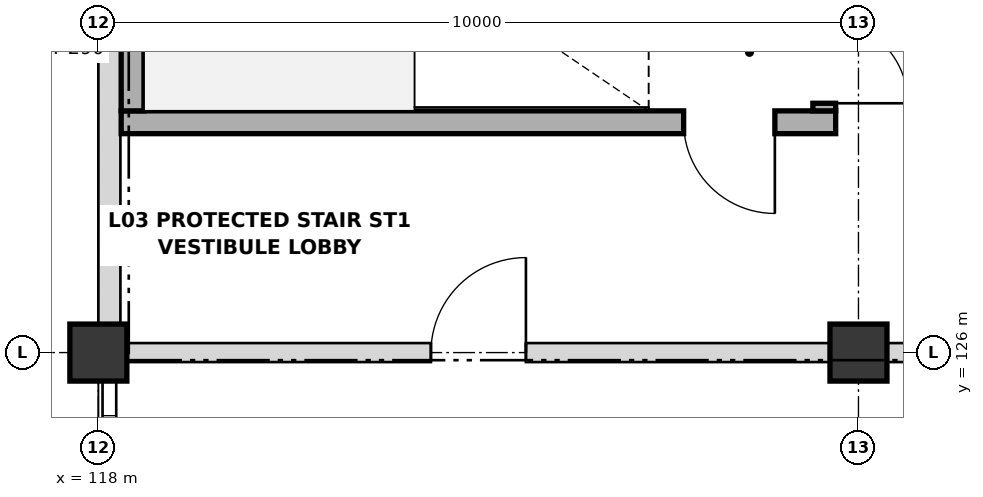
"""IFC4 building model, lengths in metres.
Left out: names, types, materials, properties, quantities, classifications, styles, units other than length and angle.
Written with IfcOpenShell. Run it as: python <this file> out.ifc"""

import sys

from ifc_helpers import new_model, si_unit, direction, frame, frame_2d, origin, origin_2d, place, context, subcontext, project, spatial, rectangle, extrude, element, fill, save


model = new_model("IFC4")
c1 = context("Model", 3, precision=1e-05, world=origin(), true_north=direction((0.0, 1.0)))
c2 = subcontext(c1, "Body", "Model", "MODEL_VIEW")
j1 = project(units=[si_unit("LENGTHUNIT", "METRE"), si_unit("PLANEANGLEUNIT", "RADIAN")], contexts=[c1])
p1 = place(None, origin())
s1 = spatial("IfcSite", under=j1, at=p1, CompositionType="ELEMENT")
p2 = place(p1, origin())
s2 = spatial("IfcBuilding", under=s1, at=p2, CompositionType="ELEMENT")
p3 = place(p2, frame((0.0, 0.0, 14.4)))
s3 = spatial("IfcBuildingStorey", under=s2, at=p3, CompositionType="ELEMENT", Elevation=14.4)
for number, where, z_axis, x_axis in (
    (1, (118.0, 126.0, 0.0), (0.0, 0.0, 1.0), (1.0, 0.0, 0.0)),
    (2, (128.0, 126.0, 0.0), (0.0, 0.0, 1.0), (1.0, 0.0, 0.0)),
):
    element("IfcColumn", number, at=place(p3, frame(where, z_axis=z_axis, x_axis=x_axis)), inside=s3, PredefinedType="COLUMN", context=c2, shape_type="SweptSolid", body=[
        extrude(rectangle(XDim=0.75, YDim=0.75, at=origin_2d()), origin(), (0.0, 0.0, 1.0), 4.2),
    ])
p4 = place(p3, frame((118.145, 126.37, 0.0), z_axis=(0.0, 0.0, 1.0), x_axis=(0.0, 1.0, 0.0)))
e3 = element("IfcWall", 3, at=p4, inside=s3, PredefinedType="SOLIDWALL", context=c2, shape_type="SweptSolid", body=[
    extrude(rectangle(XDim=7.26, YDim=0.29, at=frame_2d((3.63, 0.0))), origin(), (0.0, 0.0, 1.0), 3.078),
])
p5 = place(p3, frame((127.7, 129.03, 0.0), z_axis=(0.0, 0.0, 1.0), x_axis=(-1.0, 0.0, 0.0)))
e4 = element("IfcWall", 4, at=p5, inside=s3, PredefinedType="SHEAR", context=c2, shape_type="SweptSolid", body=[
    extrude(rectangle(XDim=9.4, YDim=0.3, at=frame_2d((4.7, 0.0))), origin(), (0.0, 0.0, 1.0), 4.2),
])
p6 = place(p5, frame((0.8, 0.0, 0.0)))
e5 = element("IfcOpeningElement", 5, at=p6, cuts=e4, PredefinedType="OPENING", context=c2, shape_type="SweptSolid", body=[
    extrude(rectangle(XDim=1.2, YDim=2.15, at=frame_2d((0.6, 1.075))), frame((0.0, 0.16, 0.0), z_axis=(0.0, -1.0, 0.0), x_axis=(1.0, 0.0, 0.0)), (0.0, 0.0, 1.0), 0.32),
])
p7 = place(p3, frame((127.55, 133.68, 0.0), z_axis=(0.0, 0.0, 1.0), x_axis=(0.0, -1.0, 0.0)))
e6 = element("IfcWall", 6, at=p7, inside=s3, PredefinedType="SHEAR", context=c2, shape_type="SweptSolid", body=[
    extrude(rectangle(XDim=4.5, YDim=0.3, at=frame_2d((2.25, 0.0))), origin(), (0.0, 0.0, 1.0), 4.2),
])
p8 = place(p7, frame((3.3, 0.0, 0.0)))
e7 = element("IfcOpeningElement", 7, at=p8, cuts=e6, PredefinedType="OPENING", context=c2, shape_type="SweptSolid", body=[
    extrude(rectangle(XDim=1.1, YDim=2.15, at=frame_2d((0.55, 1.075))), frame((0.0, 0.16, 0.0), z_axis=(0.0, -1.0, 0.0), x_axis=(1.0, 0.0, 0.0)), (0.0, 0.0, 1.0), 0.32),
])
p9 = place(p3, frame((118.45, 129.18, 0.0), z_axis=(0.0, 0.0, 1.0), x_axis=(0.0, 1.0, 0.0)))
e8 = element("IfcWall", 8, at=p9, inside=s3, PredefinedType="SHEAR", context=c2, shape_type="SweptSolid", body=[
    extrude(rectangle(XDim=4.5, YDim=0.3, at=frame_2d((2.25, 0.0))), origin(), (0.0, 0.0, 1.0), 4.2),
])
p10 = place(p3, frame((118.38, 126.0, 0.0), z_axis=(0.0, 0.0, 1.0), x_axis=(1.0, 0.0, 0.0)))
e9 = element("IfcWall", 9, at=p10, inside=s3, PredefinedType="PARTITIONING", context=c2, shape_type="SweptSolid", body=[
    extrude(rectangle(XDim=9.24, YDim=0.25, at=frame_2d((4.62, 0.0))), origin(), (0.0, 0.0, 1.0), 3.078),
])
p11 = place(p10, frame((3.995, 0.0, 0.0)))
e10 = element("IfcOpeningElement", 10, at=p11, cuts=e9, PredefinedType="OPENING", context=c2, shape_type="SweptSolid", body=[
    extrude(rectangle(XDim=1.25, YDim=2.15, at=frame_2d((0.625, 1.075))), frame((0.0, 0.135, 0.0), z_axis=(0.0, -1.0, 0.0), x_axis=(1.0, 0.0, 0.0)), (0.0, 0.0, 1.0), 0.27),
])
p12 = place(p3, frame((128.38, 126.0, 0.0), z_axis=(0.0, 0.0, 1.0), x_axis=(1.0, 0.0, 0.0)))
e11 = element("IfcWall", 11, at=p12, inside=s3, PredefinedType="PARTITIONING", context=c2, shape_type="SweptSolid", body=[
    extrude(rectangle(XDim=9.24, YDim=0.25, at=frame_2d((4.62, 0.0))), origin(), (0.0, 0.0, 1.0), 3.078),
])
p13 = place(p12, frame((1.795, 0.0, 0.0)))
e12 = element("IfcOpeningElement", 12, at=p13, cuts=e11, PredefinedType="OPENING", context=c2, shape_type="SweptSolid", body=[
    extrude(rectangle(XDim=1.25, YDim=2.15, at=frame_2d((0.625, 1.075))), frame((0.0, 0.135, 0.0), z_axis=(0.0, -1.0, 0.0), x_axis=(1.0, 0.0, 0.0)), (0.0, 0.0, 1.0), 0.27),
])
p14 = place(p12, frame((6.27, 0.0, 0.0)))
e13 = element("IfcOpeningElement", 13, at=p14, cuts=e11, PredefinedType="OPENING", context=c2, shape_type="SweptSolid", body=[
    extrude(rectangle(XDim=1.1, YDim=2.15, at=frame_2d((0.55, 1.075))), frame((0.0, 0.135, 0.0), z_axis=(0.0, -1.0, 0.0), x_axis=(1.0, 0.0, 0.0)), (0.0, 0.0, 1.0), 0.27),
])
p15 = place(p6, origin())
e14 = element("IfcDoor", 14, at=p15, inside=s3, OperationType="SINGLE_SWING_LEFT", PredefinedType="DOOR", context=c2, shape_type="SweptSolid", body=[
    extrude(rectangle(XDim=1.2, YDim=2.15, at=frame_2d((0.6, 1.075))), frame((0.0, 0.025, 0.0), z_axis=(0.0, -1.0, 0.0), x_axis=(1.0, 0.0, 0.0)), (0.0, 0.0, 1.0), 0.05),
])
fill(e5, e14)
p16 = place(p8, origin())
e15 = element("IfcDoor", 15, at=p16, inside=s3, OperationType="SINGLE_SWING_RIGHT", PredefinedType="DOOR", context=c2, shape_type="SweptSolid", body=[
    extrude(rectangle(XDim=1.1, YDim=2.15, at=frame_2d((0.55, 1.075))), frame((0.0, 0.025, 0.0), z_axis=(0.0, -1.0, 0.0), x_axis=(1.0, 0.0, 0.0)), (0.0, 0.0, 1.0), 0.05),
])
fill(e7, e15)
p17 = place(p11, origin())
e16 = element("IfcDoor", 16, at=p17, inside=s3, OperationType="SINGLE_SWING_RIGHT", PredefinedType="DOOR", context=c2, shape_type="SweptSolid", body=[
    extrude(rectangle(XDim=1.25, YDim=2.15, at=frame_2d((0.625, 1.075))), frame((0.0, 0.025, 0.0), z_axis=(0.0, -1.0, 0.0), x_axis=(1.0, 0.0, 0.0)), (0.0, 0.0, 1.0), 0.05),
])
fill(e10, e16)
save(model, sys.argv[1])
